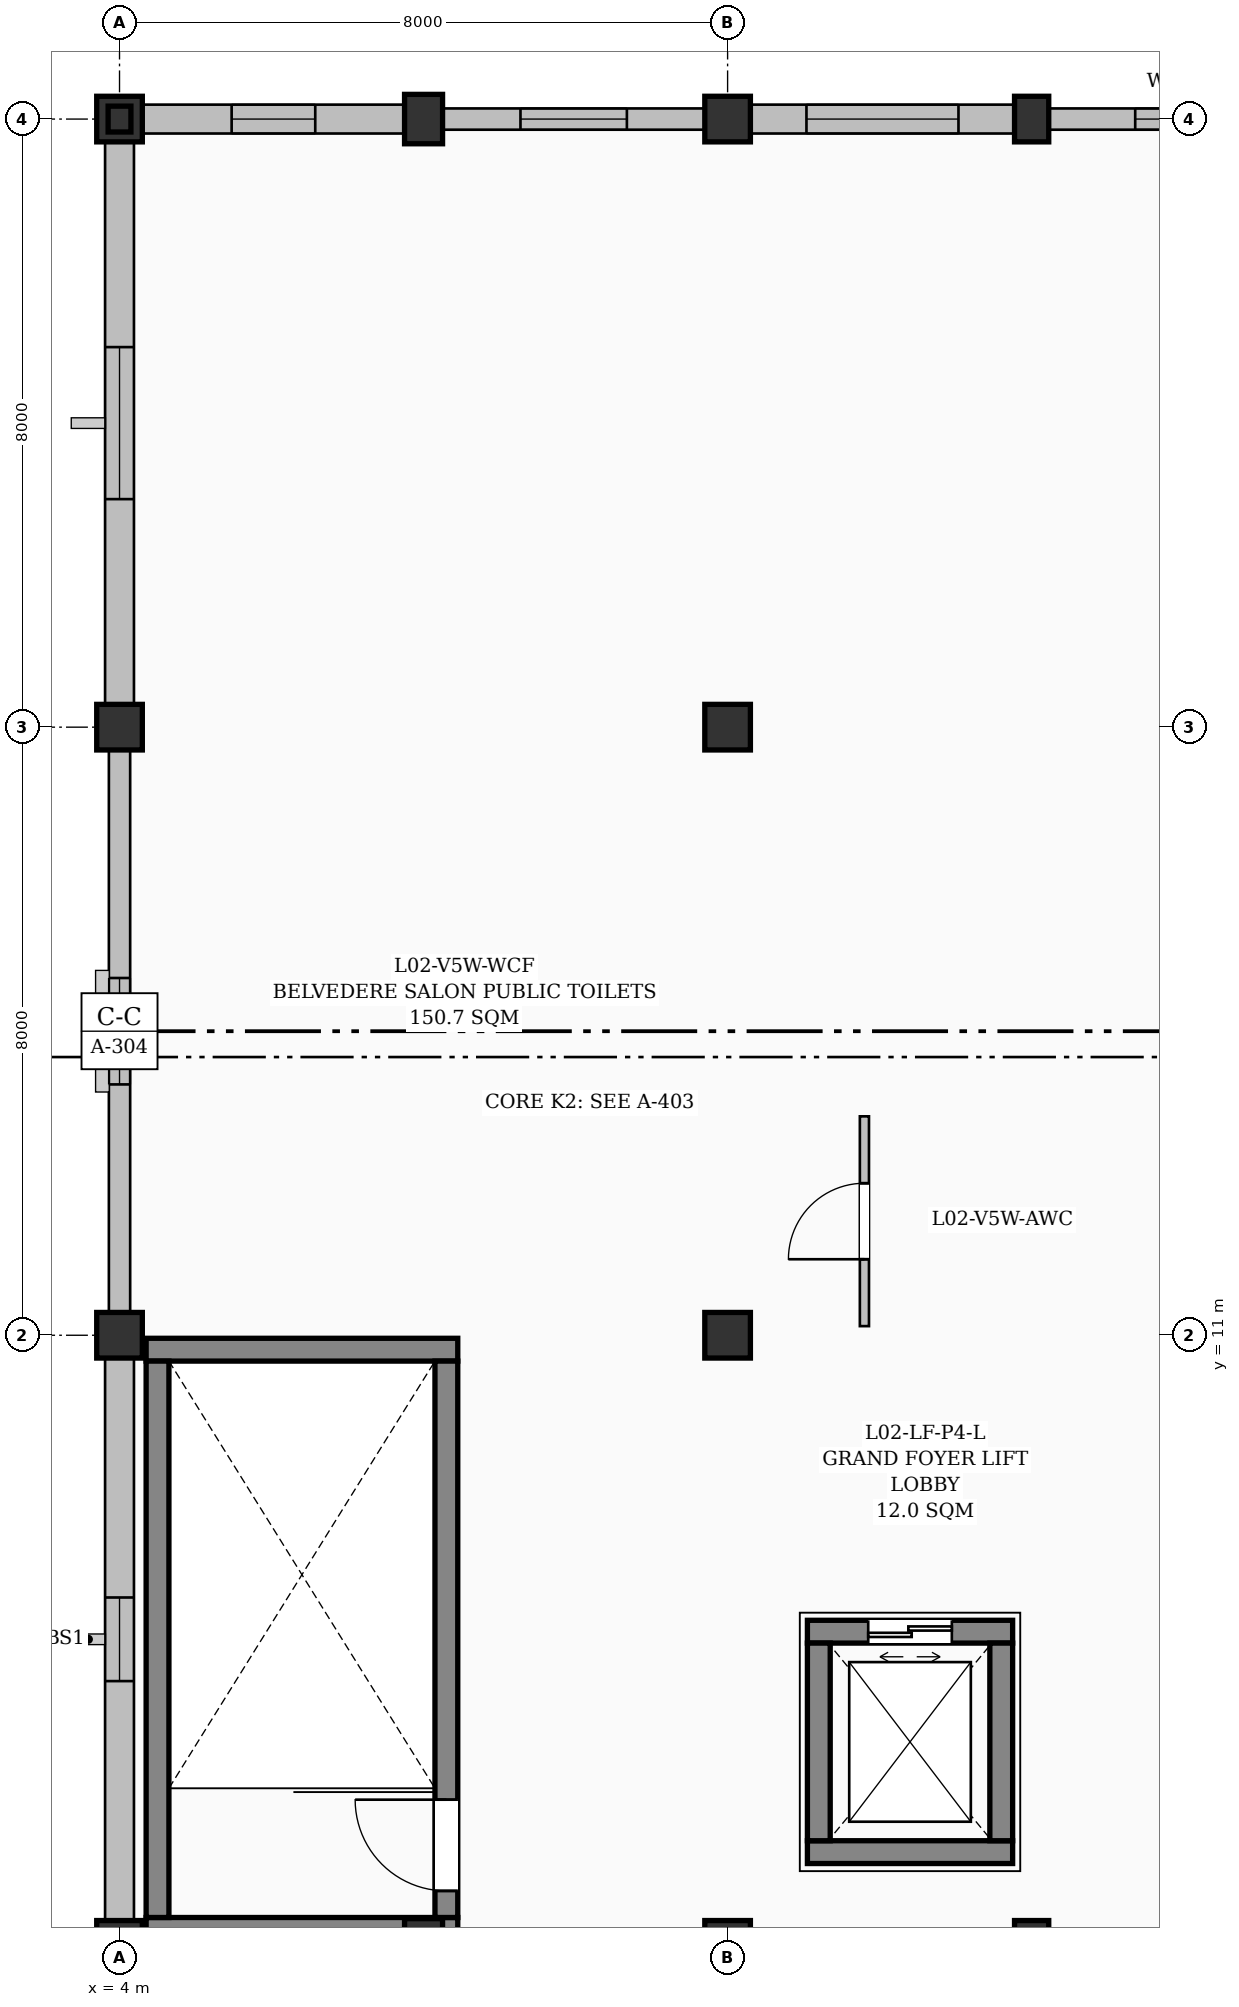
"""IFC4 building model, lengths in metres.
Left out: names, types, materials, properties, quantities, classifications, styles, units other than length and angle.
Written with IfcOpenShell. Run it as: python <this file> out.ifc"""

import sys

from ifc_helpers import new_model, si_unit, direction, frame, frame_2d, origin, origin_2d, place, context, subcontext, project, spatial, rectangle, i_section, extrude, element, fill, save


model = new_model("IFC4")
c1 = context("Model", 3, precision=1e-05, world=origin(), true_north=direction((0.0, 1.0)))
c2 = subcontext(c1, "Body", "Model", "MODEL_VIEW")
j1 = project(units=[si_unit("LENGTHUNIT", "METRE"), si_unit("PLANEANGLEUNIT", "RADIAN")], contexts=[c1])
p1 = place(None, origin())
s1 = spatial("IfcSite", under=j1, at=p1, CompositionType="ELEMENT")
p2 = place(p1, origin())
s2 = spatial("IfcBuilding", under=s1, at=p2, CompositionType="ELEMENT")
p3 = place(p2, frame((0.0, 0.0, 9.3)))
s3 = spatial("IfcBuildingStorey", under=s2, at=p3, CompositionType="ELEMENT", Elevation=9.3)
for number, where, z_axis, x_axis in (
    (1, (4.0, 3.0, 0.0), (0.0, 0.0, 1.0), (1.0, 0.0, 0.0)),
    (2, (4.0, 11.0, 0.0), (0.0, 0.0, 1.0), (1.0, 0.0, 0.0)),
    (3, (4.0, 19.0, 0.0), (0.0, 0.0, 1.0), (1.0, 0.0, 0.0)),
    (4, (4.0, 27.0, 0.0), (0.0, 0.0, 1.0), (1.0, 0.0, 0.0)),
):
    element("IfcColumn", number, at=place(p3, frame(where, z_axis=z_axis, x_axis=x_axis)), inside=s3, PredefinedType="COLUMN", context=c2, shape_type="SweptSolid", body=[
        extrude(rectangle(XDim=0.6, YDim=0.6, at=origin_2d()), origin(), (0.0, 0.0, 1.0), 4.5),
    ])
for number, where, z_axis, x_axis in (
    (5, (8.0, 3.0, 0.0), (0.0, 0.0, 1.0), (1.0, 0.0, 0.0)),
    (6, (8.0, 27.0, 0.0), (0.0, 0.0, 1.0), (1.0, 0.0, 0.0)),
):
    element("IfcColumn", number, at=place(p3, frame(where, z_axis=z_axis, x_axis=x_axis)), inside=s3, PredefinedType="PILASTER", context=c2, shape_type="SweptSolid", body=[
        extrude(rectangle(XDim=0.5, YDim=0.65, at=origin_2d()), origin(), (0.0, 0.0, 1.0), 4.5),
    ])
for number, where, z_axis, x_axis in (
    (7, (12.0, 3.0, 0.0), (0.0, 0.0, 1.0), (1.0, 0.0, 0.0)),
    (8, (12.0, 11.0, 0.0), (0.0, 0.0, 1.0), (1.0, 0.0, 0.0)),
    (9, (12.0, 19.0, 0.0), (0.0, 0.0, 1.0), (1.0, 0.0, 0.0)),
    (10, (12.0, 27.0, 0.0), (0.0, 0.0, 1.0), (1.0, 0.0, 0.0)),
):
    element("IfcColumn", number, at=place(p3, frame(where, z_axis=z_axis, x_axis=x_axis)), inside=s3, PredefinedType="COLUMN", context=c2, shape_type="SweptSolid", body=[
        extrude(rectangle(XDim=0.6, YDim=0.6, at=origin_2d()), origin(), (0.0, 0.0, 1.0), 4.5),
    ])
for number, where, z_axis, x_axis in (
    (11, (16.0, 3.0, 0.0), (0.0, 0.0, 1.0), (1.0, 0.0, 0.0)),
    (12, (16.0, 27.0, 0.0), (0.0, 0.0, 1.0), (1.0, 0.0, 0.0)),
):
    element("IfcColumn", number, at=place(p3, frame(where, z_axis=z_axis, x_axis=x_axis)), inside=s3, PredefinedType="PILASTER", context=c2, shape_type="SweptSolid", body=[
        extrude(rectangle(XDim=0.45, YDim=0.6, at=origin_2d()), origin(), (0.0, 0.0, 1.0), 4.5),
    ])
p4 = place(p3, frame((4.0, 27.0, 4.5), z_axis=(0.0, 0.0, 1.0), x_axis=(1.0, 0.0, 0.0)))
e13 = element("IfcColumn", 13, at=p4, inside=s3, PredefinedType="COLUMN", context=c2, shape_type="SweptSolid", body=[
    extrude(i_section(OverallWidth=0.3, OverallDepth=0.34, WebThickness=0.012, FlangeThickness=0.021, FilletRadius=0.027, at=origin_2d()), origin(), (0.0, 0.0, 1.0), 1.566),
])
p5 = place(p3, frame((4.0, 3.3, 0.0), z_axis=(0.0, 0.0, 1.0), x_axis=(0.0, 1.0, 0.0)))
e14 = element("IfcWall", 14, at=p5, inside=s3, PredefinedType="SOLIDWALL", context=c2, shape_type="SweptSolid", body=[
    extrude(rectangle(XDim=7.4, YDim=0.38, at=frame_2d((3.7, 0.0))), origin(), (0.0, 0.0, 1.0), 3.585),
])
p6 = place(p5, frame((3.15, 0.0, 0.95)))
e15 = element("IfcOpeningElement", 15, at=p6, cuts=e14, PredefinedType="OPENING", context=c2, shape_type="SweptSolid", body=[
    extrude(rectangle(XDim=1.1, YDim=2.0, at=frame_2d((0.55, 1.0))), frame((0.0, 0.2, 0.0), z_axis=(0.0, -1.0, 0.0), x_axis=(1.0, 0.0, 0.0)), (0.0, 0.0, 1.0), 0.4),
])
p7 = place(p3, frame((4.0, 11.3, 0.0), z_axis=(0.0, 0.0, 1.0), x_axis=(0.0, 1.0, 0.0)))
e16 = element("IfcWall", 16, at=p7, inside=s3, PredefinedType="SOLIDWALL", context=c2, shape_type="SweptSolid", body=[
    extrude(rectangle(XDim=7.4, YDim=0.28, at=frame_2d((3.7, 0.0))), origin(), (0.0, 0.0, 1.0), 3.585),
])
p8 = place(p7, frame((3.0, 0.0, 0.95)))
e17 = element("IfcOpeningElement", 17, at=p8, cuts=e16, PredefinedType="OPENING", context=c2, shape_type="SweptSolid", body=[
    extrude(rectangle(XDim=1.4, YDim=1.8, at=frame_2d((0.7, 0.9))), frame((0.0, 0.15, 0.0), z_axis=(0.0, -1.0, 0.0), x_axis=(1.0, 0.0, 0.0)), (0.0, 0.0, 1.0), 0.3),
])
p9 = place(p3, frame((4.0, 19.3, 0.0), z_axis=(0.0, 0.0, 1.0), x_axis=(0.0, 1.0, 0.0)))
e18 = element("IfcWall", 18, at=p9, inside=s3, PredefinedType="SOLIDWALL", context=c2, shape_type="SweptSolid", body=[
    extrude(rectangle(XDim=7.4, YDim=0.38, at=frame_2d((3.7, 0.0))), origin(), (0.0, 0.0, 1.0), 3.585),
])
p10 = place(p9, frame((2.7, 0.0, 0.95)))
e19 = element("IfcOpeningElement", 19, at=p10, cuts=e18, PredefinedType="OPENING", context=c2, shape_type="SweptSolid", body=[
    extrude(rectangle(XDim=2.0, YDim=1.8, at=frame_2d((1.0, 0.9))), frame((0.0, 0.2, 0.0), z_axis=(0.0, -1.0, 0.0), x_axis=(1.0, 0.0, 0.0)), (0.0, 0.0, 1.0), 0.4),
])
p11 = place(p3, frame((4.3, 27.0, 0.0), z_axis=(0.0, 0.0, 1.0), x_axis=(1.0, 0.0, 0.0)))
e20 = element("IfcWall", 20, at=p11, inside=s3, PredefinedType="SOLIDWALL", context=c2, shape_type="SweptSolid", body=[
    extrude(rectangle(XDim=3.45, YDim=0.38, at=frame_2d((1.725, 0.0))), origin(), (0.0, 0.0, 1.0), 4.125),
])
p12 = place(p11, frame((1.175, 0.0, 0.95)))
e21 = element("IfcOpeningElement", 21, at=p12, cuts=e20, PredefinedType="OPENING", context=c2, shape_type="SweptSolid", body=[
    extrude(rectangle(XDim=1.1, YDim=2.0, at=frame_2d((0.55, 1.0))), frame((0.0, 0.2, 0.0), z_axis=(0.0, -1.0, 0.0), x_axis=(1.0, 0.0, 0.0)), (0.0, 0.0, 1.0), 0.4),
])
p13 = place(p3, frame((8.25, 27.0, 0.0), z_axis=(0.0, 0.0, 1.0), x_axis=(1.0, 0.0, 0.0)))
e22 = element("IfcWall", 22, at=p13, inside=s3, PredefinedType="SOLIDWALL", context=c2, shape_type="SweptSolid", body=[
    extrude(rectangle(XDim=3.45, YDim=0.28, at=frame_2d((1.725, 0.0))), origin(), (0.0, 0.0, 1.0), 4.125),
])
p14 = place(p13, frame((1.025, 0.0, 0.95)))
e23 = element("IfcOpeningElement", 23, at=p14, cuts=e22, PredefinedType="OPENING", context=c2, shape_type="SweptSolid", body=[
    extrude(rectangle(XDim=1.4, YDim=1.8, at=frame_2d((0.7, 0.9))), frame((0.0, 0.15, 0.0), z_axis=(0.0, -1.0, 0.0), x_axis=(1.0, 0.0, 0.0)), (0.0, 0.0, 1.0), 0.3),
])
p15 = place(p3, frame((12.3, 27.0, 0.0), z_axis=(0.0, 0.0, 1.0), x_axis=(1.0, 0.0, 0.0)))
e24 = element("IfcWall", 24, at=p15, inside=s3, PredefinedType="SOLIDWALL", context=c2, shape_type="SweptSolid", body=[
    extrude(rectangle(XDim=3.475, YDim=0.38, at=frame_2d((1.737, 0.0))), origin(), (0.0, 0.0, 1.0), 4.125),
])
p16 = place(p15, frame((0.738, 0.0, 0.95)))
e25 = element("IfcOpeningElement", 25, at=p16, cuts=e24, PredefinedType="OPENING", context=c2, shape_type="SweptSolid", body=[
    extrude(rectangle(XDim=2.0, YDim=1.8, at=frame_2d((1.0, 0.9))), frame((0.0, 0.2, 0.0), z_axis=(0.0, -1.0, 0.0), x_axis=(1.0, 0.0, 0.0)), (0.0, 0.0, 1.0), 0.4),
])
p17 = place(p3, frame((16.225, 27.0, 0.0), z_axis=(0.0, 0.0, 1.0), x_axis=(1.0, 0.0, 0.0)))
e26 = element("IfcWall", 26, at=p17, inside=s3, PredefinedType="SOLIDWALL", context=c2, shape_type="SweptSolid", body=[
    extrude(rectangle(XDim=3.475, YDim=0.28, at=frame_2d((1.737, 0.0))), origin(), (0.0, 0.0, 1.0), 4.125),
])
p18 = place(p17, frame((1.137, 0.0, 0.95)))
e27 = element("IfcOpeningElement", 27, at=p18, cuts=e26, PredefinedType="OPENING", context=c2, shape_type="SweptSolid", body=[
    extrude(rectangle(XDim=1.2, YDim=1.5, at=frame_2d((0.6, 0.75))), frame((0.0, 0.15, 0.0), z_axis=(0.0, -1.0, 0.0), x_axis=(1.0, 0.0, 0.0)), (0.0, 0.0, 1.0), 0.3),
])
for number, where, z_axis, x_axis in (
    (28, (4.35, 3.19, 0.0), (0.0, 0.0, 1.0), (1.0, 0.0, 0.0)),
    (29, (8.45, 10.81, 0.0), (0.0, 0.0, 1.0), (-1.0, 0.0, 0.0)),
):
    element("IfcWall", number, at=place(p3, frame(where, z_axis=z_axis, x_axis=x_axis)), inside=s3, PredefinedType="SHEAR", context=c2, shape_type="SweptSolid", body=[
        extrude(rectangle(XDim=4.1, YDim=0.3, at=frame_2d((2.05, 0.0))), origin(), (0.0, 0.0, 1.0), 4.25),
    ])
p19 = place(p3, frame((4.5, 3.34, 0.0), z_axis=(0.0, 0.0, 1.0), x_axis=(0.0, 1.0, 0.0)))
e30 = element("IfcWall", 30, at=p19, inside=s3, PredefinedType="SHEAR", context=c2, shape_type="SweptSolid", body=[
    extrude(rectangle(XDim=7.32, YDim=0.3, at=frame_2d((3.66, 0.0))), origin(), (0.0, 0.0, 1.0), 4.25),
])
p20 = place(p3, frame((8.3, 3.34, 0.0), z_axis=(0.0, 0.0, 1.0), x_axis=(0.0, 1.0, 0.0)))
e31 = element("IfcWall", 31, at=p20, inside=s3, PredefinedType="SHEAR", context=c2, shape_type="SweptSolid", body=[
    extrude(rectangle(XDim=7.32, YDim=0.3, at=frame_2d((3.66, 0.0))), origin(), (0.0, 0.0, 1.0), 4.25),
])
p21 = place(p20, frame((0.35, 0.0, 0.0)))
e32 = element("IfcOpeningElement", 32, at=p21, cuts=e31, PredefinedType="OPENING", context=c2, shape_type="SweptSolid", body=[
    extrude(rectangle(XDim=1.2, YDim=2.15, at=frame_2d((0.6, 1.075))), frame((0.0, 0.16, 0.0), z_axis=(0.0, -1.0, 0.0), x_axis=(1.0, 0.0, 0.0)), (0.0, 0.0, 1.0), 0.32),
])
p22 = place(p3, frame((13.05, 4.2, 0.0), z_axis=(0.0, 0.0, 1.0), x_axis=(1.0, 0.0, 0.0)))
e33 = element("IfcWall", 33, at=p22, inside=s3, PredefinedType="SHEAR", context=c2, shape_type="SweptSolid", body=[
    extrude(rectangle(XDim=2.7, YDim=0.3, at=frame_2d((1.35, 0.0))), origin(), (0.0, 0.0, 1.0), 4.25),
])
p23 = place(p3, frame((15.75, 7.1, 0.0), z_axis=(0.0, 0.0, 1.0), x_axis=(-1.0, 0.0, 0.0)))
e34 = element("IfcWall", 34, at=p23, inside=s3, PredefinedType="SHEAR", context=c2, shape_type="SweptSolid", body=[
    extrude(rectangle(XDim=2.7, YDim=0.3, at=frame_2d((1.35, 0.0))), origin(), (0.0, 0.0, 1.0), 4.25),
])
p24 = place(p23, frame((0.8, 0.0, 0.0)))
e35 = element("IfcOpeningElement", 35, at=p24, cuts=e34, PredefinedType="OPENING", context=c2, shape_type="SweptSolid", body=[
    extrude(rectangle(XDim=1.1, YDim=2.15, at=frame_2d((0.55, 1.075))), frame((0.0, 0.16, 0.0), z_axis=(0.0, -1.0, 0.0), x_axis=(1.0, 0.0, 0.0)), (0.0, 0.0, 1.0), 0.32),
])
for number, where, z_axis, x_axis in (
    (36, (13.2, 4.35, 0.0), (0.0, 0.0, 1.0), (0.0, 1.0, 0.0)),
    (37, (15.6, 6.95, 0.0), (0.0, 0.0, 1.0), (0.0, -1.0, 0.0)),
):
    element("IfcWall", number, at=place(p3, frame(where, z_axis=z_axis, x_axis=x_axis)), inside=s3, PredefinedType="SHEAR", context=c2, shape_type="SweptSolid", body=[
        extrude(rectangle(XDim=2.6, YDim=0.3, at=frame_2d((1.3, 0.0))), origin(), (0.0, 0.0, 1.0), 4.25),
    ])
p25 = place(p3, frame((13.8, 11.12, 0.0), z_axis=(0.0, 0.0, 1.0), x_axis=(0.0, 1.0, 0.0)))
e38 = element("IfcWall", 38, at=p25, inside=s3, PredefinedType="PARTITIONING", context=c2, shape_type="SweptSolid", body=[
    extrude(rectangle(XDim=2.76, YDim=0.12, at=frame_2d((1.38, 0.0))), origin(), (0.0, 0.0, 1.0), 4.25),
])
p26 = place(p25, frame((0.88, 0.0, 0.0)))
e39 = element("IfcOpeningElement", 39, at=p26, cuts=e38, PredefinedType="OPENING", context=c2, shape_type="SweptSolid", body=[
    extrude(rectangle(XDim=1.0, YDim=2.1, at=frame_2d((0.5, 1.05))), frame((0.0, 0.07, 0.0), z_axis=(0.0, -1.0, 0.0), x_axis=(1.0, 0.0, 0.0)), (0.0, 0.0, 1.0), 0.14),
])
p27 = place(p6, origin())
e40 = element("IfcWindow", 40, at=p27, inside=s3, PartitioningType="SINGLE_PANEL", PredefinedType="WINDOW", context=c2, shape_type="SweptSolid", body=[
    extrude(rectangle(XDim=1.1, YDim=2.0, at=frame_2d((0.55, 1.0))), frame((0.0, 0.03, 0.0), z_axis=(0.0, -1.0, 0.0), x_axis=(1.0, 0.0, 0.0)), (0.0, 0.0, 1.0), 0.06),
])
fill(e15, e40)
p28 = place(p8, origin())
e41 = element("IfcWindow", 41, at=p28, inside=s3, PartitioningType="DOUBLE_PANEL_VERTICAL", PredefinedType="WINDOW", context=c2, shape_type="SweptSolid", body=[
    extrude(rectangle(XDim=1.4, YDim=1.8, at=frame_2d((0.7, 0.9))), frame((0.0, 0.03, 0.0), z_axis=(0.0, -1.0, 0.0), x_axis=(1.0, 0.0, 0.0)), (0.0, 0.0, 1.0), 0.06),
])
fill(e17, e41)
p29 = place(p10, origin())
e42 = element("IfcWindow", 42, at=p29, inside=s3, PartitioningType="TRIPLE_PANEL_VERTICAL", PredefinedType="WINDOW", context=c2, shape_type="SweptSolid", body=[
    extrude(rectangle(XDim=2.0, YDim=1.8, at=frame_2d((1.0, 0.9))), frame((0.0, 0.03, 0.0), z_axis=(0.0, -1.0, 0.0), x_axis=(1.0, 0.0, 0.0)), (0.0, 0.0, 1.0), 0.06),
])
fill(e19, e42)
p30 = place(p12, origin())
e43 = element("IfcWindow", 43, at=p30, inside=s3, PartitioningType="SINGLE_PANEL", PredefinedType="WINDOW", context=c2, shape_type="SweptSolid", body=[
    extrude(rectangle(XDim=1.1, YDim=2.0, at=frame_2d((0.55, 1.0))), frame((0.0, 0.03, 0.0), z_axis=(0.0, -1.0, 0.0), x_axis=(1.0, 0.0, 0.0)), (0.0, 0.0, 1.0), 0.06),
])
fill(e21, e43)
p31 = place(p14, origin())
e44 = element("IfcWindow", 44, at=p31, inside=s3, PartitioningType="DOUBLE_PANEL_VERTICAL", PredefinedType="WINDOW", context=c2, shape_type="SweptSolid", body=[
    extrude(rectangle(XDim=1.4, YDim=1.8, at=frame_2d((0.7, 0.9))), frame((0.0, 0.03, 0.0), z_axis=(0.0, -1.0, 0.0), x_axis=(1.0, 0.0, 0.0)), (0.0, 0.0, 1.0), 0.06),
])
fill(e23, e44)
p32 = place(p16, origin())
e45 = element("IfcWindow", 45, at=p32, inside=s3, PartitioningType="TRIPLE_PANEL_VERTICAL", PredefinedType="WINDOW", context=c2, shape_type="SweptSolid", body=[
    extrude(rectangle(XDim=2.0, YDim=1.8, at=frame_2d((1.0, 0.9))), frame((0.0, 0.03, 0.0), z_axis=(0.0, -1.0, 0.0), x_axis=(1.0, 0.0, 0.0)), (0.0, 0.0, 1.0), 0.06),
])
fill(e25, e45)
p33 = place(p18, origin())
e46 = element("IfcWindow", 46, at=p33, inside=s3, PartitioningType="SINGLE_PANEL", PredefinedType="WINDOW", context=c2, shape_type="SweptSolid", body=[
    extrude(rectangle(XDim=1.2, YDim=1.5, at=frame_2d((0.6, 0.75))), frame((0.0, 0.03, 0.0), z_axis=(0.0, -1.0, 0.0), x_axis=(1.0, 0.0, 0.0)), (0.0, 0.0, 1.0), 0.06),
])
fill(e27, e46)
p34 = place(p21, origin())
e47 = element("IfcDoor", 47, at=p34, inside=s3, OperationType="SINGLE_SWING_RIGHT", PredefinedType="DOOR", context=c2, shape_type="SweptSolid", body=[
    extrude(rectangle(XDim=1.2, YDim=2.15, at=frame_2d((0.6, 1.075))), frame((0.0, 0.025, 0.0), z_axis=(0.0, -1.0, 0.0), x_axis=(1.0, 0.0, 0.0)), (0.0, 0.0, 1.0), 0.05),
])
fill(e32, e47)
p35 = place(p24, origin())
e48 = element("IfcDoor", 48, at=p35, inside=s3, OperationType="DOUBLE_DOOR_SLIDING", PredefinedType="DOOR", context=c2, shape_type="SweptSolid", body=[
    extrude(rectangle(XDim=1.1, YDim=2.15, at=frame_2d((0.55, 1.075))), frame((0.0, 0.025, 0.0), z_axis=(0.0, -1.0, 0.0), x_axis=(1.0, 0.0, 0.0)), (0.0, 0.0, 1.0), 0.05),
])
fill(e35, e48)
p36 = place(p26, origin())
e49 = element("IfcDoor", 49, at=p36, inside=s3, OperationType="SINGLE_SWING_LEFT", PredefinedType="DOOR", context=c2, shape_type="SweptSolid", body=[
    extrude(rectangle(XDim=1.0, YDim=2.1, at=frame_2d((0.5, 1.05))), frame((0.0, 0.025, 0.0), z_axis=(0.0, -1.0, 0.0), x_axis=(1.0, 0.0, 0.0)), (0.0, 0.0, 1.0), 0.05),
])
fill(e39, e49)
save(model, sys.argv[1])
